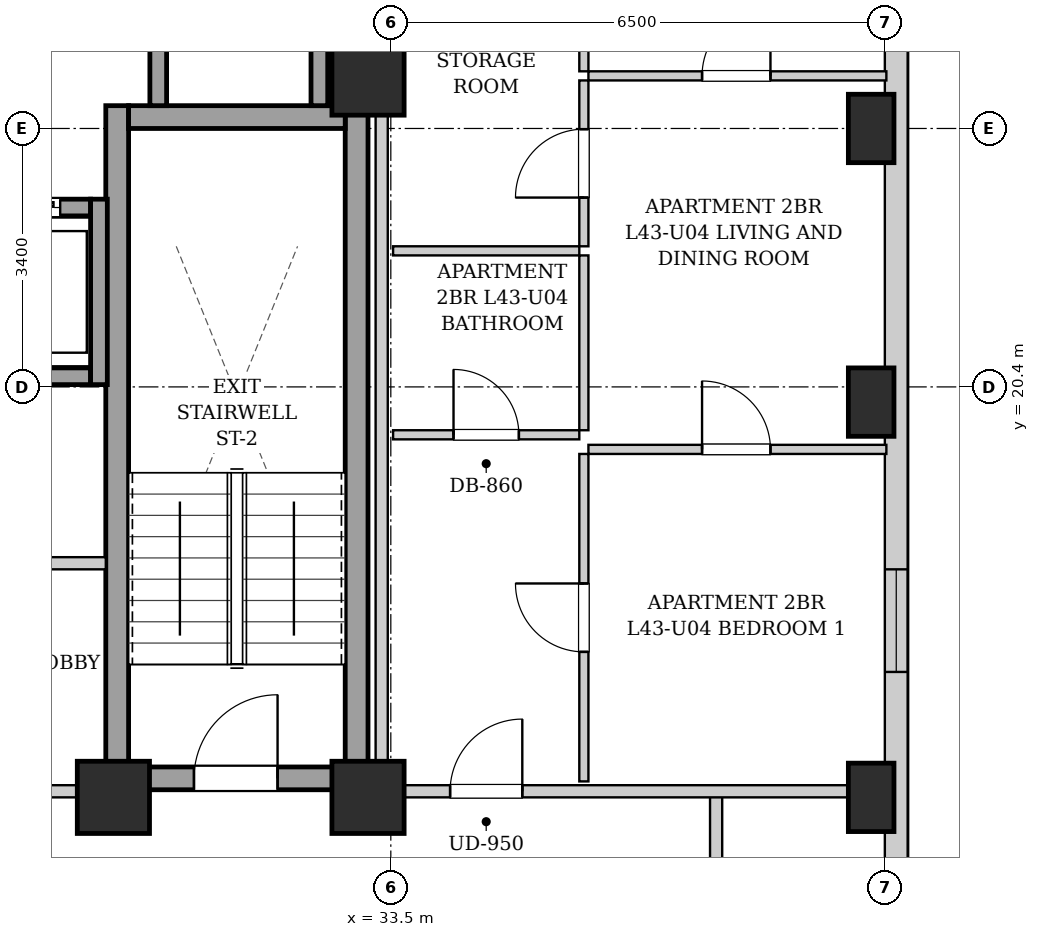
"""IFC4 building model, lengths in metres.
Left out: names, types, materials, properties, quantities, classifications, styles, units other than length and angle.
Written with IfcOpenShell. Run it as: python <this file> out.ifc"""

import sys

from ifc_helpers import new_model, si_unit, direction, frame, frame_2d, origin, origin_2d, place, context, subcontext, project, spatial, rectangle, extrude, element, fill, save


model = new_model("IFC4")
c1 = context("Model", 3, precision=1e-05, world=origin(), true_north=direction((0.0, 1.0)))
c2 = subcontext(c1, "Body", "Model", "MODEL_VIEW")
j1 = project(units=[si_unit("LENGTHUNIT", "METRE"), si_unit("PLANEANGLEUNIT", "RADIAN")], contexts=[c1])
p1 = place(None, origin())
s1 = spatial("IfcSite", under=j1, at=p1, CompositionType="ELEMENT")
p2 = place(p1, origin())
s2 = spatial("IfcBuilding", under=s1, at=p2, CompositionType="ELEMENT")
p3 = place(p2, frame((0.0, 0.0, 150.4)))
s3 = spatial("IfcBuildingStorey", under=s2, at=p3, CompositionType="ELEMENT", Elevation=150.4)
for number, where, z_axis, x_axis in (
    (1, (39.82, 15.0, 0.0), (0.0, 0.0, 1.0), (1.0, 0.0, 0.0)),
    (2, (39.82, 20.2, 0.0), (0.0, 0.0, 1.0), (1.0, 0.0, 0.0)),
    (3, (39.82, 23.8, 0.0), (0.0, 0.0, 1.0), (1.0, 0.0, 0.0)),
):
    element("IfcColumn", number, at=place(p3, frame(where, z_axis=z_axis, x_axis=x_axis)), inside=s3, PredefinedType="COLUMN", context=c2, shape_type="SweptSolid", body=[
        extrude(rectangle(XDim=0.6, YDim=0.9, at=origin_2d()), origin(), (0.0, 0.0, 1.0), 3.25),
    ])
for number, where, z_axis, x_axis in (
    (4, (29.85, 15.0, 0.0), (0.0, 0.0, 1.0), (1.0, 0.0, 0.0)),
    (5, (33.2, 15.0, 0.0), (0.0, 0.0, 1.0), (1.0, 0.0, 0.0)),
    (6, (33.2, 24.45, 0.0), (0.0, 0.0, 1.0), (1.0, 0.0, 0.0)),
):
    element("IfcColumn", number, at=place(p3, frame(where, z_axis=z_axis, x_axis=x_axis)), inside=s3, PredefinedType="COLUMN", context=c2, shape_type="SweptSolid", body=[
        extrude(rectangle(XDim=0.95, YDim=0.95, at=origin_2d()), origin(), (0.0, 0.0, 1.0), 3.25),
    ])
p4 = place(p3, frame((40.15, 40.8, 0.0), z_axis=(0.0, 0.0, 1.0), x_axis=(0.0, -1.0, 0.0)))
e7 = element("IfcWall", 7, at=p4, inside=s3, PredefinedType="SOLIDWALL", context=c2, shape_type="SweptSolid", body=[
    extrude(rectangle(XDim=34.5, YDim=0.3, at=frame_2d((17.25, 0.0))), origin(), (0.0, 0.0, 1.0), 2.99),
])
p5 = place(p4, frame((31.725, 0.0, 0.55)))
e8 = element("IfcOpeningElement", 8, at=p5, cuts=e7, PredefinedType="OPENING", context=c2, shape_type="SweptSolid", body=[
    extrude(rectangle(XDim=1.35, YDim=1.2, at=frame_2d((0.675, 0.6))), frame((0.0, 0.16, 0.0), z_axis=(0.0, -1.0, 0.0), x_axis=(1.0, 0.0, 0.0)), (0.0, 0.0, 1.0), 0.32),
])
p6 = place(p4, frame((22.8, 0.0, 0.55)))
e9 = element("IfcOpeningElement", 9, at=p6, cuts=e7, PredefinedType="OPENING", context=c2, shape_type="SweptSolid", body=[
    extrude(rectangle(XDim=1.35, YDim=1.2, at=frame_2d((0.675, 0.6))), frame((0.0, 0.16, 0.0), z_axis=(0.0, -1.0, 0.0), x_axis=(1.0, 0.0, 0.0)), (0.0, 0.0, 1.0), 0.32),
])
p7 = place(p4, frame((13.425, 0.0, 0.55)))
e10 = element("IfcOpeningElement", 10, at=p7, cuts=e7, PredefinedType="OPENING", context=c2, shape_type="SweptSolid", body=[
    extrude(rectangle(XDim=1.35, YDim=1.2, at=frame_2d((0.675, 0.6))), frame((0.0, 0.16, 0.0), z_axis=(0.0, -1.0, 0.0), x_axis=(1.0, 0.0, 0.0)), (0.0, 0.0, 1.0), 0.32),
])
for number, where, z_axis, x_axis in (
    (11, (29.9, 15.1, 0.0), (0.0, 0.0, 1.0), (0.0, 1.0, 0.0)),
    (12, (33.05, 15.1, 0.0), (0.0, 0.0, 1.0), (0.0, 1.0, 0.0)),
):
    element("IfcWall", number, at=place(p3, frame(where, z_axis=z_axis, x_axis=x_axis)), inside=s3, PredefinedType="SHEAR", context=c2, shape_type="SweptSolid", body=[
        extrude(rectangle(XDim=9.0, YDim=0.3, at=frame_2d((4.5, 0.0))), origin(), (0.0, 0.0, 1.0), 2.99),
    ])
p8 = place(p3, frame((30.05, 23.95, 0.0), z_axis=(0.0, 0.0, 1.0), x_axis=(1.0, 0.0, 0.0)))
e13 = element("IfcWall", 13, at=p8, inside=s3, PredefinedType="SHEAR", context=c2, shape_type="SweptSolid", body=[
    extrude(rectangle(XDim=2.85, YDim=0.3, at=frame_2d((1.425, 0.0))), origin(), (0.0, 0.0, 1.0), 2.99),
])
p9 = place(p3, frame((30.05, 15.25, 0.0), z_axis=(0.0, 0.0, 1.0), x_axis=(1.0, 0.0, 0.0)))
e14 = element("IfcWall", 14, at=p9, inside=s3, PredefinedType="SHEAR", context=c2, shape_type="SweptSolid", body=[
    extrude(rectangle(XDim=2.85, YDim=0.3, at=frame_2d((1.425, 0.0))), origin(), (0.0, 0.0, 1.0), 2.99),
])
p10 = place(p9, frame((0.86, 0.0, 0.0)))
e15 = element("IfcOpeningElement", 15, at=p10, cuts=e14, PredefinedType="OPENING", context=c2, shape_type="SweptSolid", body=[
    extrude(rectangle(XDim=1.1, YDim=2.05, at=frame_2d((0.55, 1.025))), frame((0.0, 0.16, 0.0), z_axis=(0.0, -1.0, 0.0), x_axis=(1.0, 0.0, 0.0)), (0.0, 0.0, 1.0), 0.32),
])
p11 = place(p3, frame((27.65, 20.54, 0.0), z_axis=(0.0, 0.0, 1.0), x_axis=(1.0, 0.0, 0.0)))
e16 = element("IfcWall", 16, at=p11, inside=s3, PredefinedType="SHEAR", context=c2, shape_type="SweptSolid", body=[
    extrude(rectangle(XDim=1.9, YDim=0.22, at=frame_2d((0.95, 0.0))), origin(), (0.0, 0.0, 1.0), 2.99),
])
p12 = place(p3, frame((27.65, 22.76, 0.0), z_axis=(0.0, 0.0, 1.0), x_axis=(1.0, 0.0, 0.0)))
e17 = element("IfcWall", 17, at=p12, inside=s3, PredefinedType="SHEAR", context=c2, shape_type="SweptSolid", body=[
    extrude(rectangle(XDim=1.9, YDim=0.22, at=frame_2d((0.95, 0.0))), origin(), (0.0, 0.0, 1.0), 2.99),
])
p13 = place(p12, frame((0.4, 0.0, 0.0)))
e18 = element("IfcOpeningElement", 18, at=p13, cuts=e17, PredefinedType="OPENING", context=c2, shape_type="SweptSolid", body=[
    extrude(rectangle(XDim=1.1, YDim=2.15, at=frame_2d((0.55, 1.075))), frame((0.0, 0.12, 0.0), z_axis=(0.0, -1.0, 0.0), x_axis=(1.0, 0.0, 0.0)), (0.0, 0.0, 1.0), 0.24),
])
p14 = place(p3, frame((29.66, 20.43, 0.0), z_axis=(0.0, 0.0, 1.0), x_axis=(0.0, 1.0, 0.0)))
e19 = element("IfcWall", 19, at=p14, inside=s3, PredefinedType="SHEAR", context=c2, shape_type="SweptSolid", body=[
    extrude(rectangle(XDim=2.44, YDim=0.22, at=frame_2d((1.22, 0.0))), origin(), (0.0, 0.0, 1.0), 2.99),
])
for number, where, z_axis, x_axis in (
    (20, (30.44, 24.1, 0.0), (0.0, 0.0, 1.0), (0.0, 1.0, 0.0)),
    (21, (32.56, 24.1, 0.0), (0.0, 0.0, 1.0), (0.0, 1.0, 0.0)),
):
    element("IfcWall", number, at=place(p3, frame(where, z_axis=z_axis, x_axis=x_axis)), inside=s3, PredefinedType="SHEAR", context=c2, shape_type="SweptSolid", body=[
        extrude(rectangle(XDim=2.07, YDim=0.22, at=frame_2d((1.035, 0.0))), origin(), (0.0, 0.0, 1.0), 2.99),
    ])
p15 = place(p3, frame((21.25, 15.08, 0.0), z_axis=(0.0, 0.0, 1.0), x_axis=(1.0, 0.0, 0.0)))
e22 = element("IfcWall", 22, at=p15, inside=s3, PredefinedType="PARTITIONING", context=c2, shape_type="SweptSolid", body=[
    extrude(rectangle(XDim=8.5, YDim=0.16, at=frame_2d((4.25, 0.0))), origin(), (0.0, 0.0, 1.0), 2.442),
])
p16 = place(p15, frame((3.725, 0.0, 0.0)))
e23 = element("IfcOpeningElement", 23, at=p16, cuts=e22, PredefinedType="OPENING", context=c2, shape_type="SweptSolid", body=[
    extrude(rectangle(XDim=1.05, YDim=2.05, at=frame_2d((0.525, 1.025))), frame((0.0, 0.09, 0.0), z_axis=(0.0, -1.0, 0.0), x_axis=(1.0, 0.0, 0.0)), (0.0, 0.0, 1.0), 0.18),
])
p17 = place(p3, frame((28.65, 18.08, 0.0), z_axis=(0.0, 0.0, 1.0), x_axis=(1.0, 0.0, 0.0)))
e24 = element("IfcWall", 24, at=p17, inside=s3, PredefinedType="PARTITIONING", context=c2, shape_type="SweptSolid", body=[
    extrude(rectangle(XDim=1.1, YDim=0.16, at=frame_2d((0.55, 0.0))), origin(), (0.0, 0.0, 1.0), 2.99),
])
p18 = place(p3, frame((33.12, 24.12, 0.0), z_axis=(0.0, 0.0, 1.0), x_axis=(0.0, 1.0, 0.0)))
e25 = element("IfcWall", 25, at=p18, inside=s3, PredefinedType="PARTITIONING", context=c2, shape_type="SweptSolid", body=[
    extrude(rectangle(XDim=4.76, YDim=0.16, at=frame_2d((2.38, 0.0))), origin(), (0.0, 0.0, 1.0), 2.99),
])
p19 = place(p3, frame((37.78, 13.35, 0.0), z_axis=(0.0, 0.0, 1.0), x_axis=(0.0, 1.0, 0.0)))
e26 = element("IfcWall", 26, at=p19, inside=s3, PredefinedType="PARTITIONING", context=c2, shape_type="SweptSolid", body=[
    extrude(rectangle(XDim=1.74, YDim=0.16, at=frame_2d((0.87, 0.0))), origin(), (0.0, 0.0, 1.0), 2.99),
])
p20 = place(p3, frame((33.38, 15.08, 0.0), z_axis=(0.0, 0.0, 1.0), x_axis=(1.0, 0.0, 0.0)))
e27 = element("IfcWall", 27, at=p20, inside=s3, PredefinedType="PARTITIONING", context=c2, shape_type="SweptSolid", body=[
    extrude(rectangle(XDim=6.64, YDim=0.16, at=frame_2d((3.32, 0.0))), origin(), (0.0, 0.0, 1.0), 2.442),
])
p21 = place(p20, frame((0.9, 0.0, 0.0)))
e28 = element("IfcOpeningElement", 28, at=p21, cuts=e27, PredefinedType="OPENING", context=c2, shape_type="SweptSolid", body=[
    extrude(rectangle(XDim=0.95, YDim=2.1, at=frame_2d((0.475, 1.05))), frame((0.0, 0.09, 0.0), z_axis=(0.0, -1.0, 0.0), x_axis=(1.0, 0.0, 0.0)), (0.0, 0.0, 1.0), 0.18),
])
p22 = place(p3, frame((33.53, 22.19, 0.0), z_axis=(0.0, 0.0, 1.0), x_axis=(1.0, 0.0, 0.0)))
e29 = element("IfcWall", 29, at=p22, inside=s3, PredefinedType="PARTITIONING", context=c2, shape_type="SweptSolid", body=[
    extrude(rectangle(XDim=2.45, YDim=0.12, at=frame_2d((1.225, 0.0))), origin(), (0.0, 0.0, 1.0), 2.99),
])
p23 = place(p3, frame((36.04, 22.25, 0.0), z_axis=(0.0, 0.0, 1.0), x_axis=(0.0, 1.0, 0.0)))
e30 = element("IfcWall", 30, at=p23, inside=s3, PredefinedType="PARTITIONING", context=c2, shape_type="SweptSolid", body=[
    extrude(rectangle(XDim=2.182, YDim=0.12, at=frame_2d((1.091, 0.0))), origin(), (0.0, 0.0, 1.0), 2.99),
])
p24 = place(p23, frame((0.641, 0.0, 0.0)))
e31 = element("IfcOpeningElement", 31, at=p24, cuts=e30, PredefinedType="OPENING", context=c2, shape_type="SweptSolid", body=[
    extrude(rectangle(XDim=0.9, YDim=2.05, at=frame_2d((0.45, 1.025))), frame((0.0, 0.07, 0.0), z_axis=(0.0, -1.0, 0.0), x_axis=(1.0, 0.0, 0.0)), (0.0, 0.0, 1.0), 0.14),
])
p25 = place(p3, frame((36.04, 24.552, 0.0), z_axis=(0.0, 0.0, 1.0), x_axis=(0.0, 1.0, 0.0)))
e32 = element("IfcWall", 32, at=p25, inside=s3, PredefinedType="PARTITIONING", context=c2, shape_type="SweptSolid", body=[
    extrude(rectangle(XDim=4.308, YDim=0.12, at=frame_2d((2.154, 0.0))), origin(), (0.0, 0.0, 1.0), 2.99),
])
p26 = place(p25, frame((1.704, 0.0, 0.0)))
e33 = element("IfcOpeningElement", 33, at=p26, cuts=e32, PredefinedType="OPENING", context=c2, shape_type="SweptSolid", body=[
    extrude(rectangle(XDim=0.9, YDim=2.05, at=frame_2d((0.45, 1.025))), frame((0.0, 0.07, 0.0), z_axis=(0.0, -1.0, 0.0), x_axis=(1.0, 0.0, 0.0)), (0.0, 0.0, 1.0), 0.14),
])
p27 = place(p3, frame((33.53, 19.77, 0.0), z_axis=(0.0, 0.0, 1.0), x_axis=(1.0, 0.0, 0.0)))
e34 = element("IfcWall", 34, at=p27, inside=s3, PredefinedType="PARTITIONING", context=c2, shape_type="SweptSolid", body=[
    extrude(rectangle(XDim=2.45, YDim=0.12, at=frame_2d((1.225, 0.0))), origin(), (0.0, 0.0, 1.0), 2.99),
])
p28 = place(p27, frame((0.795, 0.0, 0.0)))
e35 = element("IfcOpeningElement", 35, at=p28, cuts=e34, PredefinedType="OPENING", context=c2, shape_type="SweptSolid", body=[
    extrude(rectangle(XDim=0.86, YDim=2.05, at=frame_2d((0.43, 1.025))), frame((0.0, 0.07, 0.0), z_axis=(0.0, -1.0, 0.0), x_axis=(1.0, 0.0, 0.0)), (0.0, 0.0, 1.0), 0.14),
])
p29 = place(p3, frame((36.04, 19.83, 0.0), z_axis=(0.0, 0.0, 1.0), x_axis=(0.0, 1.0, 0.0)))
e36 = element("IfcWall", 36, at=p29, inside=s3, PredefinedType="PARTITIONING", context=c2, shape_type="SweptSolid", body=[
    extrude(rectangle(XDim=2.3, YDim=0.12, at=frame_2d((1.15, 0.0))), origin(), (0.0, 0.0, 1.0), 2.99),
])
p30 = place(p3, frame((36.04, 15.21, 0.0), z_axis=(0.0, 0.0, 1.0), x_axis=(0.0, 1.0, 0.0)))
e37 = element("IfcWall", 37, at=p30, inside=s3, PredefinedType="PARTITIONING", context=c2, shape_type="SweptSolid", body=[
    extrude(rectangle(XDim=4.308, YDim=0.12, at=frame_2d((2.154, 0.0))), origin(), (0.0, 0.0, 1.0), 2.99),
])
p31 = place(p30, frame((1.704, 0.0, 0.0)))
e38 = element("IfcOpeningElement", 38, at=p31, cuts=e37, PredefinedType="OPENING", context=c2, shape_type="SweptSolid", body=[
    extrude(rectangle(XDim=0.9, YDim=2.05, at=frame_2d((0.45, 1.025))), frame((0.0, 0.07, 0.0), z_axis=(0.0, -1.0, 0.0), x_axis=(1.0, 0.0, 0.0)), (0.0, 0.0, 1.0), 0.14),
])
p32 = place(p3, frame((36.1, 19.578, 0.0), z_axis=(0.0, 0.0, 1.0), x_axis=(1.0, 0.0, 0.0)))
e39 = element("IfcWall", 39, at=p32, inside=s3, PredefinedType="PARTITIONING", context=c2, shape_type="SweptSolid", body=[
    extrude(rectangle(XDim=3.92, YDim=0.12, at=frame_2d((1.96, 0.0))), origin(), (0.0, 0.0, 1.0), 2.99),
])
p33 = place(p32, frame((1.495, 0.0, 0.0)))
e40 = element("IfcOpeningElement", 40, at=p33, cuts=e39, PredefinedType="OPENING", context=c2, shape_type="SweptSolid", body=[
    extrude(rectangle(XDim=0.9, YDim=2.05, at=frame_2d((0.45, 1.025))), frame((0.0, 0.07, 0.0), z_axis=(0.0, -1.0, 0.0), x_axis=(1.0, 0.0, 0.0)), (0.0, 0.0, 1.0), 0.14),
])
p34 = place(p3, frame((36.1, 24.492, 0.0), z_axis=(0.0, 0.0, 1.0), x_axis=(1.0, 0.0, 0.0)))
e41 = element("IfcWall", 41, at=p34, inside=s3, PredefinedType="PARTITIONING", context=c2, shape_type="SweptSolid", body=[
    extrude(rectangle(XDim=3.92, YDim=0.12, at=frame_2d((1.96, 0.0))), origin(), (0.0, 0.0, 1.0), 2.621),
])
p35 = place(p34, frame((1.495, 0.0, 0.0)))
e42 = element("IfcOpeningElement", 42, at=p35, cuts=e41, PredefinedType="OPENING", context=c2, shape_type="SweptSolid", body=[
    extrude(rectangle(XDim=0.9, YDim=2.05, at=frame_2d((0.45, 1.025))), frame((0.0, 0.07, 0.0), z_axis=(0.0, -1.0, 0.0), x_axis=(1.0, 0.0, 0.0)), (0.0, 0.0, 1.0), 0.14),
])
p36 = place(p3, frame((33.38, 15.02, 0.0), z_axis=(0.0, 0.0, 1.0), x_axis=(0.0, 1.0, 0.0)))
e43 = element("IfcWall", 43, at=p36, inside=s3, PredefinedType="PARTITIONING", context=c2, shape_type="SweptSolid", body=[
    extrude(rectangle(XDim=13.98, YDim=0.16, at=frame_2d((6.99, 0.0))), origin(), (0.0, 0.0, 1.0), 2.99),
])
p37 = place(p10, origin())
e44 = element("IfcDoor", 44, at=p37, inside=s3, OperationType="SINGLE_SWING_RIGHT", PredefinedType="DOOR", context=c2, shape_type="SweptSolid", body=[
    extrude(rectangle(XDim=1.1, YDim=2.05, at=frame_2d((0.55, 1.025))), frame((0.0, 0.025, 0.0), z_axis=(0.0, -1.0, 0.0), x_axis=(1.0, 0.0, 0.0)), (0.0, 0.0, 1.0), 0.05),
])
fill(e15, e44)
p38 = place(p13, origin())
e45 = element("IfcDoor", 45, at=p38, inside=s3, OperationType="SLIDING_TO_LEFT", PredefinedType="DOOR", context=c2, shape_type="SweptSolid", body=[
    extrude(rectangle(XDim=1.1, YDim=2.15, at=frame_2d((0.55, 1.075))), frame((0.0, 0.025, 0.0), z_axis=(0.0, -1.0, 0.0), x_axis=(1.0, 0.0, 0.0)), (0.0, 0.0, 1.0), 0.05),
])
fill(e18, e45)
p39 = place(p21, origin())
e46 = element("IfcDoor", 46, at=p39, inside=s3, OperationType="SINGLE_SWING_RIGHT", PredefinedType="DOOR", context=c2, shape_type="SweptSolid", body=[
    extrude(rectangle(XDim=0.95, YDim=2.1, at=frame_2d((0.475, 1.05))), frame((0.0, 0.025, 0.0), z_axis=(0.0, -1.0, 0.0), x_axis=(1.0, 0.0, 0.0)), (0.0, 0.0, 1.0), 0.05),
])
fill(e28, e46)
p40 = place(p24, origin())
e47 = element("IfcDoor", 47, at=p40, inside=s3, OperationType="SINGLE_SWING_LEFT", PredefinedType="DOOR", context=c2, shape_type="SweptSolid", body=[
    extrude(rectangle(XDim=0.9, YDim=2.05, at=frame_2d((0.45, 1.025))), frame((0.0, 0.025, 0.0), z_axis=(0.0, -1.0, 0.0), x_axis=(1.0, 0.0, 0.0)), (0.0, 0.0, 1.0), 0.05),
])
fill(e31, e47)
p41 = place(p28, origin())
e48 = element("IfcDoor", 48, at=p41, inside=s3, OperationType="SINGLE_SWING_LEFT", PredefinedType="DOOR", context=c2, shape_type="SweptSolid", body=[
    extrude(rectangle(XDim=0.86, YDim=2.05, at=frame_2d((0.43, 1.025))), frame((0.0, 0.025, 0.0), z_axis=(0.0, -1.0, 0.0), x_axis=(1.0, 0.0, 0.0)), (0.0, 0.0, 1.0), 0.05),
])
fill(e35, e48)
p42 = place(p31, origin())
e49 = element("IfcDoor", 49, at=p42, inside=s3, OperationType="SINGLE_SWING_RIGHT", PredefinedType="DOOR", context=c2, shape_type="SweptSolid", body=[
    extrude(rectangle(XDim=0.9, YDim=2.05, at=frame_2d((0.45, 1.025))), frame((0.0, 0.025, 0.0), z_axis=(0.0, -1.0, 0.0), x_axis=(1.0, 0.0, 0.0)), (0.0, 0.0, 1.0), 0.05),
])
fill(e38, e49)
p43 = place(p33, origin())
e50 = element("IfcDoor", 50, at=p43, inside=s3, OperationType="SINGLE_SWING_LEFT", PredefinedType="DOOR", context=c2, shape_type="SweptSolid", body=[
    extrude(rectangle(XDim=0.9, YDim=2.05, at=frame_2d((0.45, 1.025))), frame((0.0, 0.025, 0.0), z_axis=(0.0, -1.0, 0.0), x_axis=(1.0, 0.0, 0.0)), (0.0, 0.0, 1.0), 0.05),
])
fill(e40, e50)
p44 = place(p35, origin())
e51 = element("IfcDoor", 51, at=p44, inside=s3, OperationType="SINGLE_SWING_RIGHT", PredefinedType="DOOR", context=c2, shape_type="SweptSolid", body=[
    extrude(rectangle(XDim=0.9, YDim=2.05, at=frame_2d((0.45, 1.025))), frame((0.0, 0.025, 0.0), z_axis=(0.0, -1.0, 0.0), x_axis=(1.0, 0.0, 0.0)), (0.0, 0.0, 1.0), 0.05),
])
fill(e42, e51)
p45 = place(p6, origin())
e52 = element("IfcWindow", 52, at=p45, inside=s3, PartitioningType="SINGLE_PANEL", PredefinedType="WINDOW", context=c2, shape_type="SweptSolid", body=[
    extrude(rectangle(XDim=1.35, YDim=1.2, at=frame_2d((0.675, 0.6))), frame((0.0, 0.03, 0.0), z_axis=(0.0, -1.0, 0.0), x_axis=(1.0, 0.0, 0.0)), (0.0, 0.0, 1.0), 0.06),
])
fill(e9, e52)
save(model, sys.argv[1])
